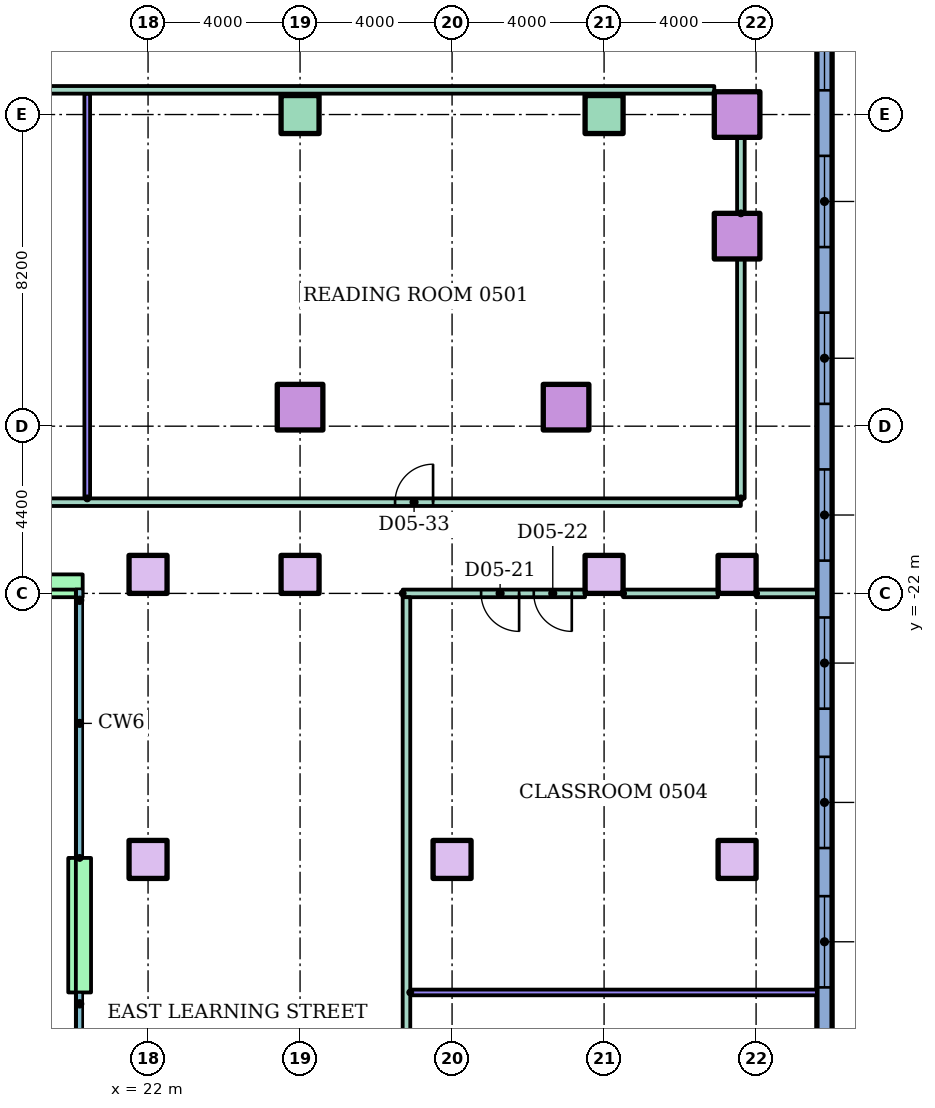
"""IFC4 building model, lengths in metres.
Left out: names, types, materials, properties, quantities, classifications, styles, units other than length and angle.
Written with IfcOpenShell. Run it as: python <this file> out.ifc"""

import sys

from ifc_helpers import new_model, si_unit, direction, frame, frame_2d, origin, origin_2d, place, context, subcontext, project, spatial, rectangle, hollow_rectangle, extrude, element, fill, save


model = new_model("IFC4")
c1 = context("Model", 3, precision=1e-05, world=origin(), true_north=direction((0.0, 1.0)))
c2 = subcontext(c1, "Body", "Model", "MODEL_VIEW")
j1 = project(units=[si_unit("LENGTHUNIT", "METRE"), si_unit("PLANEANGLEUNIT", "RADIAN")], contexts=[c1])
p1 = place(None, origin())
s1 = spatial("IfcSite", under=j1, at=p1, CompositionType="ELEMENT")
p2 = place(p1, origin())
s2 = spatial("IfcBuilding", under=s1, at=p2, CompositionType="ELEMENT")
p3 = place(p2, frame((0.0, 0.0, 22.0)))
s3 = spatial("IfcBuildingStorey", under=s2, at=p3, CompositionType="ELEMENT", Elevation=22.0)
for number, where in (
    (1, (26.0, -17.1, 0.0)),
    (2, (33.0, -17.1, 0.0)),
    (3, (37.5, -12.6, 0.0)),
):
    element("IfcColumn", number, at=place(p3, frame(where)), inside=s3, PredefinedType="COLUMN", context=c2, shape_type="SweptSolid", body=[
        extrude(hollow_rectangle(XDim=1.2, YDim=1.2, WallThickness=0.06, at=origin_2d()), origin(), (0.0, 0.0, 1.0), 4.0),
    ])
for number, where in (
    (4, (26.0, -9.4, 0.0)),
    (5, (34.0, -9.4, 0.0)),
):
    element("IfcColumn", number, at=place(p3, frame(where)), inside=s3, PredefinedType="COLUMN", context=c2, shape_type="SweptSolid", body=[
        extrude(rectangle(XDim=1.0, YDim=1.0, at=origin_2d()), origin(), (0.0, 0.0, 1.0), 4.0),
    ])
p4 = place(p3, frame((37.5, -9.4, 0.0)))
e6 = element("IfcColumn", 6, at=p4, inside=s3, PredefinedType="COLUMN", context=c2, shape_type="SweptSolid", body=[
    extrude(hollow_rectangle(XDim=1.2, YDim=1.2, WallThickness=0.06, at=origin_2d()), origin(), (0.0, 0.0, 1.0), 4.0),
])
for number, where in (
    (7, (22.0, -29.0, 0.0)),
    (8, (30.0, -29.0, 0.0)),
    (9, (37.5, -29.0, 0.0)),
    (10, (22.0, -21.5, 0.0)),
    (11, (26.0, -21.5, 0.0)),
    (12, (34.0, -21.5, 0.0)),
    (13, (37.5, -21.5, 0.0)),
):
    element("IfcColumn", number, at=place(p3, frame(where)), inside=s3, PredefinedType="COLUMN", context=c2, shape_type="SweptSolid", body=[
        extrude(rectangle(XDim=1.0, YDim=1.0, at=origin_2d()), origin(), (0.0, 0.0, 1.0), 3.7),
    ])
p5 = place(p3, frame((39.8, -50.0, 0.0), z_axis=(0.0, 0.0, 1.0), x_axis=(0.0, 1.0, 0.0)))
e14 = element("IfcWall", 14, at=p5, inside=s3, PredefinedType="STANDARD", context=c2, shape_type="SweptSolid", body=[
    extrude(rectangle(XDim=70.0, YDim=0.4, at=frame_2d((35.0, 0.0))), origin(), (0.0, 0.0, 1.0), 3.7),
])
p6 = place(p5, frame((0.75, 0.0, 0.9)))
e15 = element("IfcOpeningElement", 15, at=p6, cuts=e14, PredefinedType="OPENING", context=c2, shape_type="SweptSolid", body=[
    extrude(rectangle(XDim=2.4, YDim=2.1, at=frame_2d((1.2, 1.05))), frame((0.0, 0.21, 0.0), z_axis=(0.0, -1.0, 0.0), x_axis=(1.0, 0.0, 0.0)), (0.0, 0.0, 1.0), 0.42),
])
p7 = place(p5, frame((6.633, 0.0, 0.9)))
e16 = element("IfcOpeningElement", 16, at=p7, cuts=e14, PredefinedType="OPENING", context=c2, shape_type="SweptSolid", body=[
    extrude(rectangle(XDim=2.4, YDim=2.1, at=frame_2d((1.2, 1.05))), frame((0.0, 0.21, 0.0), z_axis=(0.0, -1.0, 0.0), x_axis=(1.0, 0.0, 0.0)), (0.0, 0.0, 1.0), 0.42),
])
p8 = place(p5, frame((10.3, 0.0, 0.9)))
e17 = element("IfcOpeningElement", 17, at=p8, cuts=e14, PredefinedType="OPENING", context=c2, shape_type="SweptSolid", body=[
    extrude(rectangle(XDim=2.4, YDim=2.1, at=frame_2d((1.2, 1.05))), frame((0.0, 0.21, 0.0), z_axis=(0.0, -1.0, 0.0), x_axis=(1.0, 0.0, 0.0)), (0.0, 0.0, 1.0), 0.42),
])
p9 = place(p5, frame((13.967, 0.0, 0.9)))
e18 = element("IfcOpeningElement", 18, at=p9, cuts=e14, PredefinedType="OPENING", context=c2, shape_type="SweptSolid", body=[
    extrude(rectangle(XDim=2.4, YDim=2.1, at=frame_2d((1.2, 1.05))), frame((0.0, 0.21, 0.0), z_axis=(0.0, -1.0, 0.0), x_axis=(1.0, 0.0, 0.0)), (0.0, 0.0, 1.0), 0.42),
])
p10 = place(p5, frame((17.633, 0.0, 0.9)))
e19 = element("IfcOpeningElement", 19, at=p10, cuts=e14, PredefinedType="OPENING", context=c2, shape_type="SweptSolid", body=[
    extrude(rectangle(XDim=2.4, YDim=2.1, at=frame_2d((1.2, 1.05))), frame((0.0, 0.21, 0.0), z_axis=(0.0, -1.0, 0.0), x_axis=(1.0, 0.0, 0.0)), (0.0, 0.0, 1.0), 0.42),
])
p11 = place(p5, frame((21.3, 0.0, 0.9)))
e20 = element("IfcOpeningElement", 20, at=p11, cuts=e14, PredefinedType="OPENING", context=c2, shape_type="SweptSolid", body=[
    extrude(rectangle(XDim=2.4, YDim=2.1, at=frame_2d((1.2, 1.05))), frame((0.0, 0.21, 0.0), z_axis=(0.0, -1.0, 0.0), x_axis=(1.0, 0.0, 0.0)), (0.0, 0.0, 1.0), 0.42),
])
p12 = place(p5, frame((24.967, 0.0, 0.9)))
e21 = element("IfcOpeningElement", 21, at=p12, cuts=e14, PredefinedType="OPENING", context=c2, shape_type="SweptSolid", body=[
    extrude(rectangle(XDim=2.4, YDim=2.1, at=frame_2d((1.2, 1.05))), frame((0.0, 0.21, 0.0), z_axis=(0.0, -1.0, 0.0), x_axis=(1.0, 0.0, 0.0)), (0.0, 0.0, 1.0), 0.42),
])
p13 = place(p5, frame((28.863, 0.0, 0.9)))
e22 = element("IfcOpeningElement", 22, at=p13, cuts=e14, PredefinedType="OPENING", context=c2, shape_type="SweptSolid", body=[
    extrude(rectangle(XDim=2.4, YDim=2.1, at=frame_2d((1.2, 1.05))), frame((0.0, 0.21, 0.0), z_axis=(0.0, -1.0, 0.0), x_axis=(1.0, 0.0, 0.0)), (0.0, 0.0, 1.0), 0.42),
])
p14 = place(p5, frame((32.988, 0.0, 0.9)))
e23 = element("IfcOpeningElement", 23, at=p14, cuts=e14, PredefinedType="OPENING", context=c2, shape_type="SweptSolid", body=[
    extrude(rectangle(XDim=2.4, YDim=2.1, at=frame_2d((1.2, 1.05))), frame((0.0, 0.21, 0.0), z_axis=(0.0, -1.0, 0.0), x_axis=(1.0, 0.0, 0.0)), (0.0, 0.0, 1.0), 0.42),
])
p15 = place(p5, frame((37.113, 0.0, 0.9)))
e24 = element("IfcOpeningElement", 24, at=p15, cuts=e14, PredefinedType="OPENING", context=c2, shape_type="SweptSolid", body=[
    extrude(rectangle(XDim=2.4, YDim=2.1, at=frame_2d((1.2, 1.05))), frame((0.0, 0.21, 0.0), z_axis=(0.0, -1.0, 0.0), x_axis=(1.0, 0.0, 0.0)), (0.0, 0.0, 1.0), 0.42),
])
p16 = place(p5, frame((41.238, 0.0, 0.9)))
e25 = element("IfcOpeningElement", 25, at=p16, cuts=e14, PredefinedType="OPENING", context=c2, shape_type="SweptSolid", body=[
    extrude(rectangle(XDim=2.4, YDim=2.1, at=frame_2d((1.2, 1.05))), frame((0.0, 0.21, 0.0), z_axis=(0.0, -1.0, 0.0), x_axis=(1.0, 0.0, 0.0)), (0.0, 0.0, 1.0), 0.42),
])
p17 = place(p5, frame((45.363, 0.0, 0.9)))
e26 = element("IfcOpeningElement", 26, at=p17, cuts=e14, PredefinedType="OPENING", context=c2, shape_type="SweptSolid", body=[
    extrude(rectangle(XDim=2.4, YDim=2.1, at=frame_2d((1.2, 1.05))), frame((0.0, 0.21, 0.0), z_axis=(0.0, -1.0, 0.0), x_axis=(1.0, 0.0, 0.0)), (0.0, 0.0, 1.0), 0.42),
])
p18 = place(p5, frame((49.488, 0.0, 0.9)))
e27 = element("IfcOpeningElement", 27, at=p18, cuts=e14, PredefinedType="OPENING", context=c2, shape_type="SweptSolid", body=[
    extrude(rectangle(XDim=2.4, YDim=2.1, at=frame_2d((1.2, 1.05))), frame((0.0, 0.21, 0.0), z_axis=(0.0, -1.0, 0.0), x_axis=(1.0, 0.0, 0.0)), (0.0, 0.0, 1.0), 0.42),
])
p19 = place(p5, frame((53.613, 0.0, 0.9)))
e28 = element("IfcOpeningElement", 28, at=p19, cuts=e14, PredefinedType="OPENING", context=c2, shape_type="SweptSolid", body=[
    extrude(rectangle(XDim=2.4, YDim=2.1, at=frame_2d((1.2, 1.05))), frame((0.0, 0.21, 0.0), z_axis=(0.0, -1.0, 0.0), x_axis=(1.0, 0.0, 0.0)), (0.0, 0.0, 1.0), 0.42),
])
p20 = place(p5, frame((57.738, 0.0, 0.9)))
e29 = element("IfcOpeningElement", 29, at=p20, cuts=e14, PredefinedType="OPENING", context=c2, shape_type="SweptSolid", body=[
    extrude(rectangle(XDim=2.4, YDim=2.1, at=frame_2d((1.2, 1.05))), frame((0.0, 0.21, 0.0), z_axis=(0.0, -1.0, 0.0), x_axis=(1.0, 0.0, 0.0)), (0.0, 0.0, 1.0), 0.42),
])
p21 = place(p5, frame((62.05, 0.0, 0.9)))
e30 = element("IfcOpeningElement", 30, at=p21, cuts=e14, PredefinedType="OPENING", context=c2, shape_type="SweptSolid", body=[
    extrude(rectangle(XDim=2.4, YDim=2.1, at=frame_2d((1.2, 1.05))), frame((0.0, 0.21, 0.0), z_axis=(0.0, -1.0, 0.0), x_axis=(1.0, 0.0, 0.0)), (0.0, 0.0, 1.0), 0.42),
])
p22 = place(p5, frame((66.55, 0.0, 0.9)))
e31 = element("IfcOpeningElement", 31, at=p22, cuts=e14, PredefinedType="OPENING", context=c2, shape_type="SweptSolid", body=[
    extrude(rectangle(XDim=2.4, YDim=2.1, at=frame_2d((1.2, 1.05))), frame((0.0, 0.21, 0.0), z_axis=(0.0, -1.0, 0.0), x_axis=(1.0, 0.0, 0.0)), (0.0, 0.0, 1.0), 0.42),
])
p23 = place(p3, frame((18.53, -21.8, 0.0)))
e32 = element("IfcWall", 32, at=p23, inside=s3, PredefinedType="STANDARD", context=c2, shape_type="SweptSolid", body=[
    extrude(rectangle(XDim=1.75, YDim=0.6, at=frame_2d((0.875, 0.0))), origin(), (0.0, 0.0, 1.0), 3.7),
])
p24 = place(p3, frame((20.2, -28.96, 0.0), z_axis=(0.0, 0.0, 1.0), x_axis=(0.0, -1.0, 0.0)))
e33 = element("IfcWall", 33, at=p24, inside=s3, PredefinedType="STANDARD", context=c2, shape_type="SweptSolid", body=[
    extrude(rectangle(XDim=3.54, YDim=0.6, at=frame_2d((1.77, 0.0))), origin(), (0.0, 0.0, 1.0), 3.7),
])
p25 = place(p3, frame((28.9, -32.5, 0.0)))
e34 = element("IfcWall", 34, at=p25, inside=s3, PredefinedType="PARTITIONING", context=c2, shape_type="SweptSolid", body=[
    extrude(rectangle(XDim=10.7, YDim=0.15, at=frame_2d((5.35, 0.0))), origin(), (0.0, 0.0, 1.0), 3.2),
])
p26 = place(p3, frame((28.7, -22.0, 0.0)))
e35 = element("IfcWall", 35, at=p26, inside=s3, PredefinedType="PARTITIONING", context=c2, shape_type="SweptSolid", body=[
    extrude(rectangle(XDim=4.8, YDim=0.2, at=frame_2d((2.4, 0.0))), origin(), (0.0, 0.0, 1.0), 3.2),
])
p27 = place(p26, frame((2.064, 0.0, 0.0)))
e36 = element("IfcOpeningElement", 36, at=p27, cuts=e35, PredefinedType="OPENING", context=c2, shape_type="SweptSolid", body=[
    extrude(rectangle(XDim=1.0, YDim=2.1, at=frame_2d((0.5, 1.05))), frame((0.0, 0.11, 0.0), z_axis=(0.0, -1.0, 0.0), x_axis=(1.0, 0.0, 0.0)), (0.0, 0.0, 1.0), 0.22),
])
p28 = place(p26, frame((3.45, 0.0, 0.0)))
e37 = element("IfcOpeningElement", 37, at=p28, cuts=e35, PredefinedType="OPENING", context=c2, shape_type="SweptSolid", body=[
    extrude(rectangle(XDim=1.0, YDim=2.1, at=frame_2d((0.5, 1.05))), frame((0.0, 0.11, 0.0), z_axis=(0.0, -1.0, 0.0), x_axis=(1.0, 0.0, 0.0)), (0.0, 0.0, 1.0), 0.22),
])
p29 = place(p3, frame((34.5, -22.0, 0.0)))
e38 = element("IfcWall", 38, at=p29, inside=s3, PredefinedType="PARTITIONING", context=c2, shape_type="SweptSolid", body=[
    extrude(rectangle(XDim=2.5, YDim=0.2, at=frame_2d((1.25, 0.0))), origin(), (0.0, 0.0, 1.0), 3.2),
])
p30 = place(p3, frame((38.0, -22.0, 0.0)))
e39 = element("IfcWall", 39, at=p30, inside=s3, PredefinedType="PARTITIONING", context=c2, shape_type="SweptSolid", body=[
    extrude(rectangle(XDim=1.6, YDim=0.2, at=frame_2d((0.8, 0.0))), origin(), (0.0, 0.0, 1.0), 3.2),
])
p31 = place(p3, frame((-37.6, -19.6, 0.0)))
e40 = element("IfcWall", 40, at=p31, inside=s3, PredefinedType="PARTITIONING", context=c2, shape_type="SweptSolid", body=[
    extrude(rectangle(XDim=75.2, YDim=0.2, at=frame_2d((37.6, 0.0))), origin(), (0.0, 0.0, 1.0), 3.2),
])
p32 = place(p31, frame((5.5, 0.0, 0.0)))
e41 = element("IfcOpeningElement", 41, at=p32, cuts=e40, PredefinedType="OPENING", context=c2, shape_type="SweptSolid", body=[
    extrude(rectangle(XDim=1.0, YDim=2.1, at=frame_2d((0.5, 1.05))), frame((0.0, 0.11, 0.0), z_axis=(0.0, -1.0, 0.0), x_axis=(1.0, 0.0, 0.0)), (0.0, 0.0, 1.0), 0.22),
])
p33 = place(p31, frame((17.5, 0.0, 0.0)))
e42 = element("IfcOpeningElement", 42, at=p33, cuts=e40, PredefinedType="OPENING", context=c2, shape_type="SweptSolid", body=[
    extrude(rectangle(XDim=1.0, YDim=2.1, at=frame_2d((0.5, 1.05))), frame((0.0, 0.11, 0.0), z_axis=(0.0, -1.0, 0.0), x_axis=(1.0, 0.0, 0.0)), (0.0, 0.0, 1.0), 0.22),
])
p34 = place(p31, frame((29.5, 0.0, 0.0)))
e43 = element("IfcOpeningElement", 43, at=p34, cuts=e40, PredefinedType="OPENING", context=c2, shape_type="SweptSolid", body=[
    extrude(rectangle(XDim=1.0, YDim=2.1, at=frame_2d((0.5, 1.05))), frame((0.0, 0.11, 0.0), z_axis=(0.0, -1.0, 0.0), x_axis=(1.0, 0.0, 0.0)), (0.0, 0.0, 1.0), 0.22),
])
p35 = place(p31, frame((40.5, 0.0, 0.0)))
e44 = element("IfcOpeningElement", 44, at=p35, cuts=e40, PredefinedType="OPENING", context=c2, shape_type="SweptSolid", body=[
    extrude(rectangle(XDim=1.0, YDim=2.1, at=frame_2d((0.5, 1.05))), frame((0.0, 0.11, 0.0), z_axis=(0.0, -1.0, 0.0), x_axis=(1.0, 0.0, 0.0)), (0.0, 0.0, 1.0), 0.22),
])
p36 = place(p31, frame((51.5, 0.0, 0.0)))
e45 = element("IfcOpeningElement", 45, at=p36, cuts=e40, PredefinedType="OPENING", context=c2, shape_type="SweptSolid", body=[
    extrude(rectangle(XDim=1.0, YDim=2.1, at=frame_2d((0.5, 1.05))), frame((0.0, 0.11, 0.0), z_axis=(0.0, -1.0, 0.0), x_axis=(1.0, 0.0, 0.0)), (0.0, 0.0, 1.0), 0.22),
])
p37 = place(p31, frame((66.1, 0.0, 0.0)))
e46 = element("IfcOpeningElement", 46, at=p37, cuts=e40, PredefinedType="OPENING", context=c2, shape_type="SweptSolid", body=[
    extrude(rectangle(XDim=1.0, YDim=2.1, at=frame_2d((0.5, 1.05))), frame((0.0, 0.11, 0.0), z_axis=(0.0, -1.0, 0.0), x_axis=(1.0, 0.0, 0.0)), (0.0, 0.0, 1.0), 0.22),
])
p38 = place(p3, frame((-36.9, -8.75, 0.0)))
e47 = element("IfcWall", 47, at=p38, inside=s3, PredefinedType="PARTITIONING", context=c2, shape_type="SweptSolid", body=[
    extrude(rectangle(XDim=73.8, YDim=0.2, at=frame_2d((36.9, 0.0))), origin(), (0.0, 0.0, 1.0), 3.2),
])
p39 = place(p3, frame((20.4, -19.5, 0.0), z_axis=(0.0, 0.0, 1.0), x_axis=(0.0, 1.0, 0.0)))
e48 = element("IfcWall", 48, at=p39, inside=s3, PredefinedType="PARTITIONING", context=c2, shape_type="SweptSolid", body=[
    extrude(rectangle(XDim=10.65, YDim=0.15, at=frame_2d((5.325, 0.0))), origin(), (0.0, 0.0, 1.0), 3.2),
])
p40 = place(p3, frame((28.8, -44.0, 0.0), z_axis=(0.0, 0.0, 1.0), x_axis=(0.0, 1.0, 0.0)))
e49 = element("IfcWall", 49, at=p40, inside=s3, PredefinedType="PARTITIONING", context=c2, shape_type="SweptSolid", body=[
    extrude(rectangle(XDim=21.9, YDim=0.2, at=frame_2d((10.95, 0.0))), origin(), (0.0, 0.0, 1.0), 3.2),
])
p41 = place(p40, frame((2.03, 0.0, 0.0)))
e50 = element("IfcOpeningElement", 50, at=p41, cuts=e49, PredefinedType="OPENING", context=c2, shape_type="SweptSolid", body=[
    extrude(rectangle(XDim=1.0, YDim=2.1, at=frame_2d((0.5, 1.05))), frame((0.0, 0.11, 0.0), z_axis=(0.0, -1.0, 0.0), x_axis=(1.0, 0.0, 0.0)), (0.0, 0.0, 1.0), 0.22),
])
p42 = place(p40, frame((8.62, 0.0, 0.0)))
e51 = element("IfcOpeningElement", 51, at=p42, cuts=e49, PredefinedType="OPENING", context=c2, shape_type="SweptSolid", body=[
    extrude(rectangle(XDim=1.0, YDim=2.1, at=frame_2d((0.5, 1.05))), frame((0.0, 0.11, 0.0), z_axis=(0.0, -1.0, 0.0), x_axis=(1.0, 0.0, 0.0)), (0.0, 0.0, 1.0), 0.22),
])
p43 = place(p3, frame((37.6, -19.5, 0.0), z_axis=(0.0, 0.0, 1.0), x_axis=(0.0, 1.0, 0.0)))
e52 = element("IfcWall", 52, at=p43, inside=s3, PredefinedType="PARTITIONING", context=c2, shape_type="SweptSolid", body=[
    extrude(rectangle(XDim=6.3, YDim=0.2, at=frame_2d((3.15, 0.0))), origin(), (0.0, 0.0, 1.0), 3.2),
])
p44 = place(p3, frame((37.6, -12.0, 0.0), z_axis=(0.0, 0.0, 1.0), x_axis=(0.0, 1.0, 0.0)))
e53 = element("IfcWall", 53, at=p44, inside=s3, PredefinedType="PARTITIONING", context=c2, shape_type="SweptSolid", body=[
    extrude(rectangle(XDim=2.0, YDim=0.2, at=frame_2d((1.0, 0.0))), origin(), (0.0, 0.0, 1.0), 3.2),
])
p45 = place(p10, origin())
e54 = element("IfcWindow", 54, at=p45, inside=s3, PartitioningType="SINGLE_PANEL", PredefinedType="WINDOW", context=c2, shape_type="SweptSolid", body=[
    extrude(rectangle(XDim=2.4, YDim=2.1, at=frame_2d((1.2, 1.05))), frame((0.0, 0.03, 0.0), z_axis=(0.0, -1.0, 0.0), x_axis=(1.0, 0.0, 0.0)), (0.0, 0.0, 1.0), 0.06),
])
fill(e19, e54)
p46 = place(p11, origin())
e55 = element("IfcWindow", 55, at=p46, inside=s3, PartitioningType="SINGLE_PANEL", PredefinedType="WINDOW", context=c2, shape_type="SweptSolid", body=[
    extrude(rectangle(XDim=2.4, YDim=2.1, at=frame_2d((1.2, 1.05))), frame((0.0, 0.03, 0.0), z_axis=(0.0, -1.0, 0.0), x_axis=(1.0, 0.0, 0.0)), (0.0, 0.0, 1.0), 0.06),
])
fill(e20, e55)
p47 = place(p12, origin())
e56 = element("IfcWindow", 56, at=p47, inside=s3, PartitioningType="SINGLE_PANEL", PredefinedType="WINDOW", context=c2, shape_type="SweptSolid", body=[
    extrude(rectangle(XDim=2.4, YDim=2.1, at=frame_2d((1.2, 1.05))), frame((0.0, 0.03, 0.0), z_axis=(0.0, -1.0, 0.0), x_axis=(1.0, 0.0, 0.0)), (0.0, 0.0, 1.0), 0.06),
])
fill(e21, e56)
p48 = place(p13, origin())
e57 = element("IfcWindow", 57, at=p48, inside=s3, PartitioningType="SINGLE_PANEL", PredefinedType="WINDOW", context=c2, shape_type="SweptSolid", body=[
    extrude(rectangle(XDim=2.4, YDim=2.1, at=frame_2d((1.2, 1.05))), frame((0.0, 0.03, 0.0), z_axis=(0.0, -1.0, 0.0), x_axis=(1.0, 0.0, 0.0)), (0.0, 0.0, 1.0), 0.06),
])
fill(e22, e57)
p49 = place(p14, origin())
e58 = element("IfcWindow", 58, at=p49, inside=s3, PartitioningType="SINGLE_PANEL", PredefinedType="WINDOW", context=c2, shape_type="SweptSolid", body=[
    extrude(rectangle(XDim=2.4, YDim=2.1, at=frame_2d((1.2, 1.05))), frame((0.0, 0.03, 0.0), z_axis=(0.0, -1.0, 0.0), x_axis=(1.0, 0.0, 0.0)), (0.0, 0.0, 1.0), 0.06),
])
fill(e23, e58)
p50 = place(p15, origin())
e59 = element("IfcWindow", 59, at=p50, inside=s3, PartitioningType="SINGLE_PANEL", PredefinedType="WINDOW", context=c2, shape_type="SweptSolid", body=[
    extrude(rectangle(XDim=2.4, YDim=2.1, at=frame_2d((1.2, 1.05))), frame((0.0, 0.03, 0.0), z_axis=(0.0, -1.0, 0.0), x_axis=(1.0, 0.0, 0.0)), (0.0, 0.0, 1.0), 0.06),
])
fill(e24, e59)
p51 = place(p16, origin())
e60 = element("IfcWindow", 60, at=p51, inside=s3, PartitioningType="SINGLE_PANEL", PredefinedType="WINDOW", context=c2, shape_type="SweptSolid", body=[
    extrude(rectangle(XDim=2.4, YDim=2.1, at=frame_2d((1.2, 1.05))), frame((0.0, 0.03, 0.0), z_axis=(0.0, -1.0, 0.0), x_axis=(1.0, 0.0, 0.0)), (0.0, 0.0, 1.0), 0.06),
])
fill(e25, e60)
p52 = place(p27, frame((1.0, 0.0, 0.0), z_axis=(0.0, 0.0, 1.0), x_axis=(-1.0, 0.0, 0.0)))
e61 = element("IfcDoor", 61, at=p52, inside=s3, OperationType="SINGLE_SWING_RIGHT", PredefinedType="DOOR", context=c2, shape_type="SweptSolid", body=[
    extrude(rectangle(XDim=1.0, YDim=2.1, at=frame_2d((0.5, 1.05))), frame((0.0, 0.025, 0.0), z_axis=(0.0, -1.0, 0.0), x_axis=(1.0, 0.0, 0.0)), (0.0, 0.0, 1.0), 0.05),
])
fill(e36, e61)
p53 = place(p28, frame((1.0, 0.0, 0.0), z_axis=(0.0, 0.0, 1.0), x_axis=(-1.0, 0.0, 0.0)))
e62 = element("IfcDoor", 62, at=p53, inside=s3, OperationType="SINGLE_SWING_RIGHT", PredefinedType="DOOR", context=c2, shape_type="SweptSolid", body=[
    extrude(rectangle(XDim=1.0, YDim=2.1, at=frame_2d((0.5, 1.05))), frame((0.0, 0.025, 0.0), z_axis=(0.0, -1.0, 0.0), x_axis=(1.0, 0.0, 0.0)), (0.0, 0.0, 1.0), 0.05),
])
fill(e37, e62)
p54 = place(p37, origin())
e63 = element("IfcDoor", 63, at=p54, inside=s3, OperationType="SINGLE_SWING_RIGHT", PredefinedType="DOOR", context=c2, shape_type="SweptSolid", body=[
    extrude(rectangle(XDim=1.0, YDim=2.1, at=frame_2d((0.5, 1.05))), frame((0.0, 0.025, 0.0), z_axis=(0.0, -1.0, 0.0), x_axis=(1.0, 0.0, 0.0)), (0.0, 0.0, 1.0), 0.05),
])
fill(e46, e63)
save(model, sys.argv[1])
